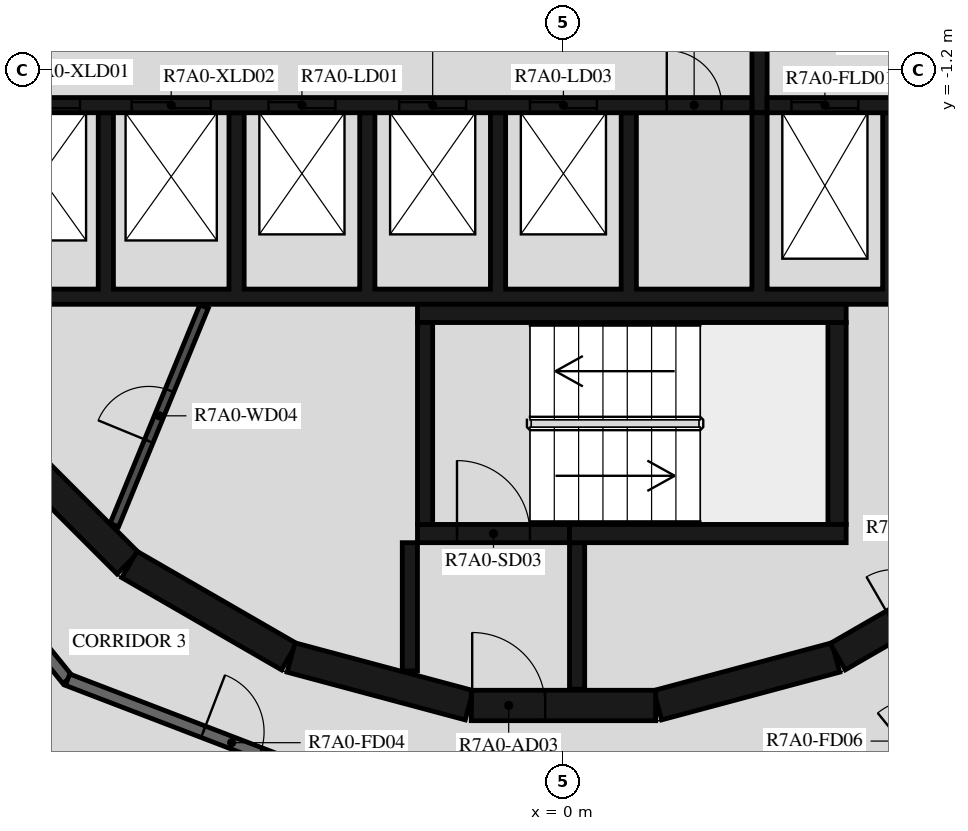
"""IFC4 building model, lengths in metres.
Left out: names, types, materials, properties, quantities, classifications, styles, units other than length and angle.
Written with IfcOpenShell. Run it as: python <this file> out.ifc"""

import sys

from ifc_helpers import new_model, si_unit, direction, frame, frame_2d, origin, place, context, subcontext, project, spatial, polyline, rectangle, outline, extrude, element, fill, save


model = new_model("IFC4")
c1 = context("Model", 3, precision=1e-05, world=origin(), true_north=direction((0.0, 1.0)))
c2 = subcontext(c1, "Body", "Model", "MODEL_VIEW")
j1 = project(units=[si_unit("LENGTHUNIT", "METRE"), si_unit("PLANEANGLEUNIT", "RADIAN")], contexts=[c1])
p1 = place(None, origin())
s1 = spatial("IfcSite", under=j1, at=p1, CompositionType="ELEMENT")
p2 = place(p1, origin())
s2 = spatial("IfcBuilding", under=s1, at=p2, CompositionType="ELEMENT")
p3 = place(p2, frame((0.0, 0.0, 263.4)))
s3 = spatial("IfcBuildingStorey", under=s2, at=p3, CompositionType="ELEMENT", Elevation=263.4)
p4 = place(p3, frame((24.757, -7.212, 0.03), z_axis=(0.0, 0.0, 1.0), x_axis=(-0.843392095095, -0.537298589177, 0.0)))
e1 = element("IfcWall", 1, at=p4, inside=s3, PredefinedType="PARAPET", context=c2, shape_type="SweptSolid", body=[
    extrude(rectangle(XDim=34.009, YDim=0.2, at=frame_2d((17.004, 0.0))), origin(), (0.0, 0.0, 1.0), 1.5),
])
p5 = place(p3, frame((1.55, -11.643, 0.0), z_axis=(0.0, 0.0, 1.0), x_axis=(0.965948410781, 0.258734743916, 0.0)))
e2 = element("IfcWall", 2, at=p5, inside=s3, PredefinedType="SHEAR", context=c2, shape_type="SweptSolid", body=[
    extrude(rectangle(XDim=3.033, YDim=0.5, at=frame_2d((1.516, 0.0))), origin(), (0.0, 0.0, 1.0), 3.12),
])
p6 = place(p3, frame((4.51, -10.845, 0.0), z_axis=(0.0, 0.0, 1.0), x_axis=(0.865975092491, 0.500087131594, 0.0)))
e3 = element("IfcWall", 3, at=p6, inside=s3, PredefinedType="SHEAR", context=c2, shape_type="SweptSolid", body=[
    extrude(rectangle(XDim=3.033, YDim=0.5, at=frame_2d((1.516, 0.0))), origin(), (0.0, 0.0, 1.0), 3.12),
])
p7 = place(p6, frame((1.066, 0.0, 0.0)))
e4 = element("IfcOpeningElement", 4, at=p7, cuts=e3, PredefinedType="OPENING", context=c2, shape_type="SweptSolid", body=[
    extrude(rectangle(XDim=0.9, YDim=2.1, at=frame_2d((0.45, 1.05))), frame((0.0, 0.26, 0.0), z_axis=(0.0, -1.0, 0.0), x_axis=(1.0, 0.0, 0.0)), (0.0, 0.0, 1.0), 0.52),
])
p8 = place(p3, frame((-9.308, -7.164, 0.0), z_axis=(0.0, 0.0, 1.0), x_axis=(0.707106781187, -0.707106781187, 0.0)))
e5 = element("IfcWall", 5, at=p8, inside=s3, PredefinedType="SHEAR", context=c2, shape_type="SweptSolid", body=[
    extrude(rectangle(XDim=3.032, YDim=0.5, at=frame_2d((1.516, 0.0))), origin(), (0.0, 0.0, 1.0), 3.12),
])
for number, where, z_axis, x_axis in (
    (6, (-7.137, -9.329, 0.0), (0.0, 0.0, 1.0), (0.866, -0.5, 0.0)),
    (7, (-4.479, -10.858, 0.0), (0.0, 0.0, 1.0), (0.966, -0.259, 0.0)),
):
    element("IfcWall", number, at=place(p3, frame(where, z_axis=z_axis, x_axis=x_axis)), inside=s3, PredefinedType="SHEAR", context=c2, shape_type="SweptSolid", body=[
        extrude(rectangle(XDim=3.033, YDim=0.5, at=frame_2d((1.516, 0.0))), origin(), (0.0, 0.0, 1.0), 3.12),
    ])
p9 = place(p3, frame((-1.516, -11.647, 0.0), z_axis=(0.0, 0.0, 1.0), x_axis=(1.0, 0.0, 0.0)))
e8 = element("IfcWall", 8, at=p9, inside=s3, PredefinedType="SHEAR", context=c2, shape_type="SweptSolid", body=[
    extrude(rectangle(XDim=3.033, YDim=0.5, at=frame_2d((1.516, 0.0))), origin(), (0.0, 0.0, 1.0), 3.12),
])
p10 = place(p9, frame((0.016, 0.0, 0.0)))
e9 = element("IfcOpeningElement", 9, at=p10, cuts=e8, PredefinedType="OPENING", context=c2, shape_type="SweptSolid", body=[
    extrude(rectangle(XDim=1.2, YDim=2.1, at=frame_2d((0.6, 1.05))), frame((0.0, 0.26, 0.0), z_axis=(0.0, -1.0, 0.0), x_axis=(1.0, 0.0, 0.0)), (0.0, 0.0, 1.0), 0.52),
])
p11 = place(p3, frame((-2.275, -8.67, 0.0), z_axis=(0.0, 0.0, 1.0), x_axis=(0.0, 1.0, 0.0)))
e10 = element("IfcWall", 10, at=p11, inside=s3, PredefinedType="SHEAR", context=c2, shape_type="SweptSolid", body=[
    extrude(rectangle(XDim=3.32, YDim=0.25, at=frame_2d((1.66, 0.0))), origin(), (0.0, 0.0, 1.0), 3.12),
])
p12 = place(p3, frame((-2.4, -5.2, 0.0), z_axis=(0.0, 0.0, 1.0), x_axis=(1.0, 0.0, 0.0)))
e11 = element("IfcWall", 11, at=p12, inside=s3, PredefinedType="SHEAR", context=c2, shape_type="SweptSolid", body=[
    extrude(rectangle(XDim=7.05, YDim=0.3, at=frame_2d((3.525, 0.0))), origin(), (0.0, 0.0, 1.0), 3.12),
])
p13 = place(p3, frame((4.5, -8.67, 0.0), z_axis=(0.0, 0.0, 1.0), x_axis=(0.0, 1.0, 0.0)))
e12 = element("IfcWall", 12, at=p13, inside=s3, PredefinedType="SHEAR", context=c2, shape_type="SweptSolid", body=[
    extrude(rectangle(XDim=3.32, YDim=0.3, at=frame_2d((1.66, 0.0))), origin(), (0.0, 0.0, 1.0), 3.12),
])
p14 = place(p3, frame((0.1, -8.82, 0.0), z_axis=(0.0, 0.0, 1.0), x_axis=(1.0, 0.0, 0.0)))
e13 = element("IfcWall", 13, at=p14, inside=s3, PredefinedType="SHEAR", context=c2, shape_type="SweptSolid", body=[
    extrude(rectangle(XDim=4.55, YDim=0.3, at=frame_2d((2.275, 0.0))), origin(), (0.0, 0.0, 1.0), 3.12),
])
p15 = place(p3, frame((-2.4, -8.82, 0.0), z_axis=(0.0, 0.0, 1.0), x_axis=(1.0, 0.0, 0.0)))
e14 = element("IfcWall", 14, at=p15, inside=s3, PredefinedType="SHEAR", context=c2, shape_type="SweptSolid", body=[
    extrude(rectangle(XDim=2.5, YDim=0.3, at=frame_2d((1.25, 0.0))), origin(), (0.0, 0.0, 1.0), 3.12),
])
p16 = place(p15, frame((0.65, 0.0, 0.0)))
e15 = element("IfcOpeningElement", 15, at=p16, cuts=e14, PredefinedType="OPENING", context=c2, shape_type="SweptSolid", body=[
    extrude(rectangle(XDim=1.2, YDim=2.1, at=frame_2d((0.6, 1.05))), frame((0.0, 0.16, 0.0), z_axis=(0.0, -1.0, 0.0), x_axis=(1.0, 0.0, 0.0)), (0.0, 0.0, 1.0), 0.32),
])
p17 = place(p3, frame((-2.525, -8.97, 0.0), z_axis=(0.0, 0.0, 1.0), x_axis=(0.0, -1.0, 0.0)))
e16 = element("IfcWall", 16, at=p17, inside=s3, PredefinedType="SHEAR", context=c2, shape_type="SweptSolid", body=[
    extrude(rectangle(XDim=2.11, YDim=0.25, at=frame_2d((1.055, 0.0))), origin(), (0.0, 0.0, 1.0), 3.12),
])
p18 = place(p3, frame((0.225, -8.97, 0.0), z_axis=(0.0, 0.0, 1.0), x_axis=(0.0, -1.0, 0.0)))
e17 = element("IfcWall", 17, at=p18, inside=s3, PredefinedType="SHEAR", context=c2, shape_type="SweptSolid", body=[
    extrude(rectangle(XDim=2.41, YDim=0.25, at=frame_2d((1.205, 0.0))), origin(), (0.0, 0.0, 1.0), 3.12),
])
p19 = place(p3, origin())
e18 = element("IfcWall", 18, at=p19, inside=s3, PredefinedType="SHEAR", context=c2, shape_type="SweptSolid", body=[
    extrude(outline(polyline([(9.8, -5.05), (9.8, -4.8), (9.8, -1.9), (9.55, -1.9), (9.55, -4.8), (7.65, -4.8), (7.65, -1.9), (7.4, -1.9), (7.4, -4.8), (5.5, -4.8), (5.5, -1.9), (5.25, -1.9), (5.25, -4.8), (3.35, -4.8), (3.35, -1.9), (3.1, -1.9), (3.1, -4.8), (1.2, -4.8), (1.2, -1.9), (0.95, -1.9), (0.95, -4.8), (-0.95, -4.8), (-0.95, -1.9), (-1.2, -1.9), (-1.2, -4.8), (-3.1, -4.8), (-3.1, -1.9), (-3.35, -1.9), (-3.35, -4.8), (-5.25, -4.8), (-5.25, -1.9), (-5.5, -1.9), (-5.5, -4.8), (-7.4, -4.8), (-7.4, -1.9), (-7.65, -1.9), (-7.65, -4.8), (-9.55, -4.8), (-9.55, -1.9), (-9.8, -1.9), (-9.8, -4.8), (-9.8, -5.05), (9.8, -5.05)])), origin(), (0.0, 0.0, 1.0), 3.12),
])
p20 = place(p3, frame((-11.28, -1.775, 0.0), z_axis=(0.0, 0.0, 1.0), x_axis=(1.0, 0.0, 0.0)))
e19 = element("IfcWall", 19, at=p20, inside=s3, PredefinedType="SHEAR", context=c2, shape_type="SweptSolid", body=[
    extrude(rectangle(XDim=14.38, YDim=0.25, at=frame_2d((7.19, 0.0))), origin(), (0.0, 0.0, 1.0), 3.12),
])
p21 = place(p20, frame((2.03, 0.0, 0.0)))
e20 = element("IfcOpeningElement", 20, at=p21, cuts=e19, PredefinedType="OPENING", context=c2, shape_type="SweptSolid", body=[
    extrude(rectangle(XDim=1.3, YDim=2.1, at=frame_2d((0.65, 1.05))), frame((0.0, 0.135, 0.0), z_axis=(0.0, -1.0, 0.0), x_axis=(1.0, 0.0, 0.0)), (0.0, 0.0, 1.0), 0.27),
])
p22 = place(p20, frame((4.18, 0.0, 0.0)))
e21 = element("IfcOpeningElement", 21, at=p22, cuts=e19, PredefinedType="OPENING", context=c2, shape_type="SweptSolid", body=[
    extrude(rectangle(XDim=1.3, YDim=2.1, at=frame_2d((0.65, 1.05))), frame((0.0, 0.135, 0.0), z_axis=(0.0, -1.0, 0.0), x_axis=(1.0, 0.0, 0.0)), (0.0, 0.0, 1.0), 0.27),
])
p23 = place(p20, frame((6.43, 0.0, 0.0)))
e22 = element("IfcOpeningElement", 22, at=p23, cuts=e19, PredefinedType="OPENING", context=c2, shape_type="SweptSolid", body=[
    extrude(rectangle(XDim=1.1, YDim=2.1, at=frame_2d((0.55, 1.05))), frame((0.0, 0.135, 0.0), z_axis=(0.0, -1.0, 0.0), x_axis=(1.0, 0.0, 0.0)), (0.0, 0.0, 1.0), 0.27),
])
p24 = place(p20, frame((8.58, 0.0, 0.0)))
e23 = element("IfcOpeningElement", 23, at=p24, cuts=e19, PredefinedType="OPENING", context=c2, shape_type="SweptSolid", body=[
    extrude(rectangle(XDim=1.1, YDim=2.1, at=frame_2d((0.55, 1.05))), frame((0.0, 0.135, 0.0), z_axis=(0.0, -1.0, 0.0), x_axis=(1.0, 0.0, 0.0)), (0.0, 0.0, 1.0), 0.27),
])
p25 = place(p20, frame((10.73, 0.0, 0.0)))
e24 = element("IfcOpeningElement", 24, at=p25, cuts=e19, PredefinedType="OPENING", context=c2, shape_type="SweptSolid", body=[
    extrude(rectangle(XDim=1.1, YDim=2.1, at=frame_2d((0.55, 1.05))), frame((0.0, 0.135, 0.0), z_axis=(0.0, -1.0, 0.0), x_axis=(1.0, 0.0, 0.0)), (0.0, 0.0, 1.0), 0.27),
])
p26 = place(p20, frame((12.98, 0.0, 0.0)))
e25 = element("IfcOpeningElement", 25, at=p26, cuts=e19, PredefinedType="OPENING", context=c2, shape_type="SweptSolid", body=[
    extrude(rectangle(XDim=0.9, YDim=2.1, at=frame_2d((0.45, 1.05))), frame((0.0, 0.135, 0.0), z_axis=(0.0, -1.0, 0.0), x_axis=(1.0, 0.0, 0.0)), (0.0, 0.0, 1.0), 0.27),
])
p27 = place(p3, frame((3.35, -1.775, 0.0), z_axis=(0.0, 0.0, 1.0), x_axis=(1.0, 0.0, 0.0)))
e26 = element("IfcWall", 26, at=p27, inside=s3, PredefinedType="SHEAR", context=c2, shape_type="SweptSolid", body=[
    extrude(rectangle(XDim=7.93, YDim=0.25, at=frame_2d((3.965, 0.0))), origin(), (0.0, 0.0, 1.0), 3.12),
])
p28 = place(p27, frame((0.4, 0.0, 0.0)))
e27 = element("IfcOpeningElement", 27, at=p28, cuts=e26, PredefinedType="OPENING", context=c2, shape_type="SweptSolid", body=[
    extrude(rectangle(XDim=1.1, YDim=2.4, at=frame_2d((0.55, 1.2))), frame((0.0, 0.135, 0.0), z_axis=(0.0, -1.0, 0.0), x_axis=(1.0, 0.0, 0.0)), (0.0, 0.0, 1.0), 0.27),
])
p29 = place(p27, frame((2.55, 0.0, 0.0)))
e28 = element("IfcOpeningElement", 28, at=p29, cuts=e26, PredefinedType="OPENING", context=c2, shape_type="SweptSolid", body=[
    extrude(rectangle(XDim=1.1, YDim=2.4, at=frame_2d((0.55, 1.2))), frame((0.0, 0.135, 0.0), z_axis=(0.0, -1.0, 0.0), x_axis=(1.0, 0.0, 0.0)), (0.0, 0.0, 1.0), 0.27),
])
p30 = place(p27, frame((4.7, 0.0, 0.0)))
e29 = element("IfcOpeningElement", 29, at=p30, cuts=e26, PredefinedType="OPENING", context=c2, shape_type="SweptSolid", body=[
    extrude(rectangle(XDim=1.1, YDim=2.4, at=frame_2d((0.55, 1.2))), frame((0.0, 0.135, 0.0), z_axis=(0.0, -1.0, 0.0), x_axis=(1.0, 0.0, 0.0)), (0.0, 0.0, 1.0), 0.27),
])
p31 = place(p3, frame((3.225, -1.9, 0.0), z_axis=(0.0, 0.0, 1.0), x_axis=(0.0, 1.0, 0.0)))
e30 = element("IfcWall", 30, at=p31, inside=s3, PredefinedType="SHEAR", context=c2, shape_type="SweptSolid", body=[
    extrude(rectangle(XDim=3.8, YDim=0.25, at=frame_2d((1.9, 0.0))), origin(), (0.0, 0.0, 1.0), 3.12),
])
p32 = place(p3, frame((-7.385, -8.681, 0.0), z_axis=(0.0, 0.0, 1.0), x_axis=(0.379804590409, 0.925066739811, 0.0)))
e31 = element("IfcWall", 31, at=p32, inside=s3, PredefinedType="PARTITIONING", context=c2, shape_type="SweptSolid", body=[
    extrude(rectangle(XDim=3.885, YDim=0.15, at=frame_2d((1.942, 0.0))), origin(), (0.0, 0.0, 1.0), 3.12),
])
p33 = place(p32, frame((1.493, 0.0, 0.0)))
e32 = element("IfcOpeningElement", 32, at=p33, cuts=e31, PredefinedType="OPENING", context=c2, shape_type="SweptSolid", body=[
    extrude(rectangle(XDim=0.9, YDim=2.1, at=frame_2d((0.45, 1.05))), frame((0.0, 0.085, 0.0), z_axis=(0.0, -1.0, 0.0), x_axis=(1.0, 0.0, 0.0)), (0.0, 0.0, 1.0), 0.17),
])
p34 = place(p3, frame((-12.673, -5.643, 0.0), z_axis=(0.0, 0.0, 1.0), x_axis=(0.629302871585, -0.777160148113, 0.0)))
e33 = element("IfcWall", 33, at=p34, inside=s3, PredefinedType="STANDARD", context=c2, shape_type="SweptSolid", body=[
    extrude(rectangle(XDim=7.181, YDim=0.2, at=frame_2d((3.59, 0.0))), origin(), (0.0, 0.0, 1.0), 3.12),
])
p35 = place(p3, frame((-8.154, -11.223, 0.0), z_axis=(0.0, 0.0, 1.0), x_axis=(0.93359073609, -0.358341090983, 0.0)))
e34 = element("IfcWall", 34, at=p35, inside=s3, PredefinedType="STANDARD", context=c2, shape_type="SweptSolid", body=[
    extrude(rectangle(XDim=7.181, YDim=0.2, at=frame_2d((3.59, 0.0))), origin(), (0.0, 0.0, 1.0), 3.12),
])
p36 = place(p35, frame((2.39, 0.0, 0.0)))
e35 = element("IfcOpeningElement", 35, at=p36, cuts=e34, PredefinedType="OPENING", context=c2, shape_type="SweptSolid", body=[
    extrude(rectangle(XDim=1.0, YDim=2.1, at=frame_2d((0.5, 1.05))), frame((0.0, 0.11, 0.0), z_axis=(0.0, -1.0, 0.0), x_axis=(1.0, 0.0, 0.0)), (0.0, 0.0, 1.0), 0.22),
])
p37 = place(p16, origin())
e36 = element("IfcDoor", 36, at=p37, inside=s3, OperationType="SINGLE_SWING_LEFT", PredefinedType="DOOR", context=c2, shape_type="SweptSolid", body=[
    extrude(rectangle(XDim=1.2, YDim=2.1, at=frame_2d((0.6, 1.05))), frame((0.0, 0.025, 0.0), z_axis=(0.0, -1.0, 0.0), x_axis=(1.0, 0.0, 0.0)), (0.0, 0.0, 1.0), 0.05),
])
fill(e15, e36)
p38 = place(p10, origin())
e37 = element("IfcDoor", 37, at=p38, inside=s3, OperationType="SINGLE_SWING_RIGHT", PredefinedType="DOOR", context=c2, shape_type="SweptSolid", body=[
    extrude(rectangle(XDim=1.2, YDim=2.1, at=frame_2d((0.6, 1.05))), frame((0.0, 0.025, 0.0), z_axis=(0.0, -1.0, 0.0), x_axis=(1.0, 0.0, 0.0)), (0.0, 0.0, 1.0), 0.05),
])
fill(e9, e37)
p39 = place(p21, origin())
e38 = element("IfcDoor", 38, at=p39, inside=s3, OperationType="DOUBLE_DOOR_SLIDING", PredefinedType="DOOR", context=c2, shape_type="SweptSolid", body=[
    extrude(rectangle(XDim=1.3, YDim=2.1, at=frame_2d((0.65, 1.05))), frame((0.0, 0.025, 0.0), z_axis=(0.0, -1.0, 0.0), x_axis=(1.0, 0.0, 0.0)), (0.0, 0.0, 1.0), 0.05),
])
fill(e20, e38)
p40 = place(p22, origin())
e39 = element("IfcDoor", 39, at=p40, inside=s3, OperationType="DOUBLE_DOOR_SLIDING", PredefinedType="DOOR", context=c2, shape_type="SweptSolid", body=[
    extrude(rectangle(XDim=1.3, YDim=2.1, at=frame_2d((0.65, 1.05))), frame((0.0, 0.025, 0.0), z_axis=(0.0, -1.0, 0.0), x_axis=(1.0, 0.0, 0.0)), (0.0, 0.0, 1.0), 0.05),
])
fill(e21, e39)
p41 = place(p23, origin())
e40 = element("IfcDoor", 40, at=p41, inside=s3, OperationType="DOUBLE_DOOR_SLIDING", PredefinedType="DOOR", context=c2, shape_type="SweptSolid", body=[
    extrude(rectangle(XDim=1.1, YDim=2.1, at=frame_2d((0.55, 1.05))), frame((0.0, 0.025, 0.0), z_axis=(0.0, -1.0, 0.0), x_axis=(1.0, 0.0, 0.0)), (0.0, 0.0, 1.0), 0.05),
])
fill(e22, e40)
p42 = place(p24, origin())
e41 = element("IfcDoor", 41, at=p42, inside=s3, OperationType="DOUBLE_DOOR_SLIDING", PredefinedType="DOOR", context=c2, shape_type="SweptSolid", body=[
    extrude(rectangle(XDim=1.1, YDim=2.1, at=frame_2d((0.55, 1.05))), frame((0.0, 0.025, 0.0), z_axis=(0.0, -1.0, 0.0), x_axis=(1.0, 0.0, 0.0)), (0.0, 0.0, 1.0), 0.05),
])
fill(e23, e41)
p43 = place(p25, origin())
e42 = element("IfcDoor", 42, at=p43, inside=s3, OperationType="DOUBLE_DOOR_SLIDING", PredefinedType="DOOR", context=c2, shape_type="SweptSolid", body=[
    extrude(rectangle(XDim=1.1, YDim=2.1, at=frame_2d((0.55, 1.05))), frame((0.0, 0.025, 0.0), z_axis=(0.0, -1.0, 0.0), x_axis=(1.0, 0.0, 0.0)), (0.0, 0.0, 1.0), 0.05),
])
fill(e24, e42)
p44 = place(p28, origin())
e43 = element("IfcDoor", 43, at=p44, inside=s3, OperationType="DOUBLE_DOOR_SLIDING", PredefinedType="DOOR", context=c2, shape_type="SweptSolid", body=[
    extrude(rectangle(XDim=1.1, YDim=2.4, at=frame_2d((0.55, 1.2))), frame((0.0, 0.025, 0.0), z_axis=(0.0, -1.0, 0.0), x_axis=(1.0, 0.0, 0.0)), (0.0, 0.0, 1.0), 0.05),
])
fill(e27, e43)
p45 = place(p26, origin())
e44 = element("IfcDoor", 44, at=p45, inside=s3, OperationType="SINGLE_SWING_LEFT", PredefinedType="DOOR", context=c2, shape_type="SweptSolid", body=[
    extrude(rectangle(XDim=0.9, YDim=2.1, at=frame_2d((0.45, 1.05))), frame((0.0, 0.025, 0.0), z_axis=(0.0, -1.0, 0.0), x_axis=(1.0, 0.0, 0.0)), (0.0, 0.0, 1.0), 0.05),
])
fill(e25, e44)
p46 = place(p33, origin())
e45 = element("IfcDoor", 45, at=p46, inside=s3, OperationType="SINGLE_SWING_RIGHT", PredefinedType="DOOR", context=c2, shape_type="SweptSolid", body=[
    extrude(rectangle(XDim=0.9, YDim=2.1, at=frame_2d((0.45, 1.05))), frame((0.0, 0.025, 0.0), z_axis=(0.0, -1.0, 0.0), x_axis=(1.0, 0.0, 0.0)), (0.0, 0.0, 1.0), 0.05),
])
fill(e32, e45)
p47 = place(p36, origin())
e46 = element("IfcDoor", 46, at=p47, inside=s3, OperationType="SINGLE_SWING_RIGHT", PredefinedType="DOOR", context=c2, shape_type="SweptSolid", body=[
    extrude(rectangle(XDim=1.0, YDim=2.1, at=frame_2d((0.5, 1.05))), frame((0.0, 0.025, 0.0), z_axis=(0.0, -1.0, 0.0), x_axis=(1.0, 0.0, 0.0)), (0.0, 0.0, 1.0), 0.05),
])
fill(e35, e46)
save(model, sys.argv[1])
